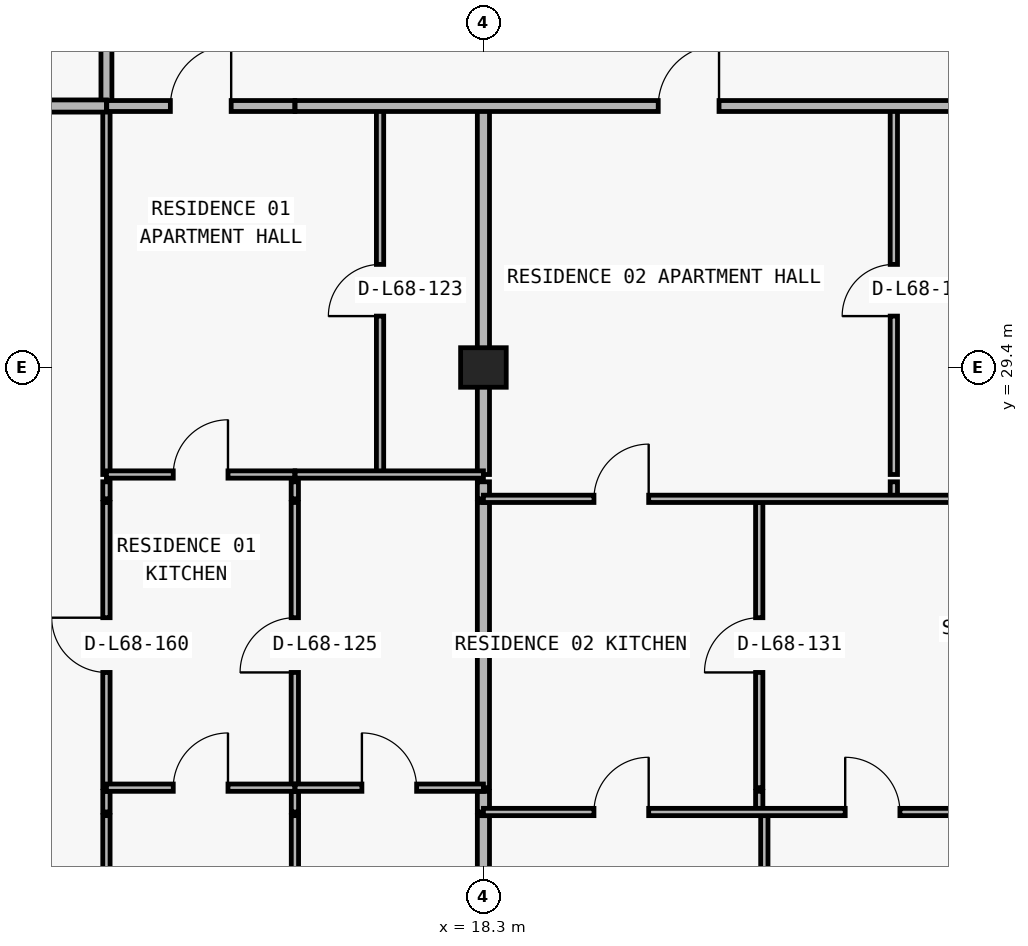
"""IFC4 building model, lengths in metres.
Left out: names, types, materials, properties, quantities, classifications, styles, units other than length and angle.
Written with IfcOpenShell. Run it as: python <this file> out.ifc"""

import sys

from ifc_helpers import new_model, si_unit, direction, frame, frame_2d, origin, origin_2d, place, context, subcontext, project, spatial, rectangle, extrude, element, fill, save


model = new_model("IFC4")
c1 = context("Model", 3, precision=1e-05, world=origin(), true_north=direction((0.0, 1.0)))
c2 = subcontext(c1, "Body", "Model", "MODEL_VIEW")
j1 = project(units=[si_unit("LENGTHUNIT", "METRE"), si_unit("PLANEANGLEUNIT", "RADIAN")], contexts=[c1])
p1 = place(None, origin())
s1 = spatial("IfcSite", under=j1, at=p1, CompositionType="ELEMENT")
p2 = place(p1, origin())
s2 = spatial("IfcBuilding", under=s1, at=p2, CompositionType="ELEMENT")
p3 = place(p2, frame((0.0, 0.0, 243.0)))
s3 = spatial("IfcBuildingStorey", under=s2, at=p3, CompositionType="ELEMENT", Elevation=243.0)
p4 = place(p3, frame((18.3, 29.4, 0.0), z_axis=(0.0, 0.0, 1.0), x_axis=(1.0, 0.0, 0.0)))
e1 = element("IfcColumn", 1, at=p4, inside=s3, PredefinedType="COLUMN", context=c2, shape_type="SweptSolid", body=[
    extrude(rectangle(XDim=0.75, YDim=0.65, at=origin_2d()), origin(), (0.0, 0.0, 1.0), 3.05),
])
p5 = place(p3, frame((12.1, 13.385, 0.0), z_axis=(0.0, 0.0, 1.0), x_axis=(0.0, 1.0, 0.0)))
e2 = element("IfcWall", 2, at=p5, inside=s3, PredefinedType="PARTITIONING", context=c2, shape_type="SweptSolid", body=[
    extrude(rectangle(XDim=8.645, YDim=0.12, at=frame_2d((4.323, 0.0))), origin(), (0.0, 0.0, 1.0), 3.05),
])
p6 = place(p3, frame((12.1, 22.09, 0.0), z_axis=(0.0, 0.0, 1.0), x_axis=(0.0, 1.0, 0.0)))
e3 = element("IfcWall", 3, at=p6, inside=s3, PredefinedType="PARTITIONING", context=c2, shape_type="SweptSolid", body=[
    extrude(rectangle(XDim=0.34, YDim=0.12, at=frame_2d((0.17, 0.0))), origin(), (0.0, 0.0, 1.0), 3.05),
])
p7 = place(p3, frame((12.1, 22.49, 0.0), z_axis=(0.0, 0.0, 1.0), x_axis=(0.0, 1.0, 0.0)))
e4 = element("IfcWall", 4, at=p7, inside=s3, PredefinedType="PARTITIONING", context=c2, shape_type="SweptSolid", body=[
    extrude(rectangle(XDim=4.69, YDim=0.12, at=frame_2d((2.345, 0.0))), origin(), (0.0, 0.0, 1.0), 3.05),
])
p8 = place(p7, frame((1.895, 0.0, 0.0)))
e5 = element("IfcOpeningElement", 5, at=p8, cuts=e4, PredefinedType="OPENING", context=c2, shape_type="SweptSolid", body=[
    extrude(rectangle(XDim=0.9, YDim=2.15, at=frame_2d((0.45, 1.075))), frame((0.0, 0.07, 0.0), z_axis=(0.0, -1.0, 0.0), x_axis=(1.0, 0.0, 0.0)), (0.0, 0.0, 1.0), 0.14),
])
p9 = place(p3, frame((12.1, 27.24, 0.0), z_axis=(0.0, 0.0, 1.0), x_axis=(0.0, 1.0, 0.0)))
e6 = element("IfcWall", 6, at=p9, inside=s3, PredefinedType="PARTITIONING", context=c2, shape_type="SweptSolid", body=[
    extrude(rectangle(XDim=0.28, YDim=0.12, at=frame_2d((0.14, 0.0))), origin(), (0.0, 0.0, 1.0), 3.05),
])
p10 = place(p3, frame((12.1, 27.64, 0.0), z_axis=(0.0, 0.0, 1.0), x_axis=(0.0, 1.0, 0.0)))
e7 = element("IfcWall", 7, at=p10, inside=s3, PredefinedType="PARTITIONING", context=c2, shape_type="SweptSolid", body=[
    extrude(rectangle(XDim=6.06, YDim=0.12, at=frame_2d((3.03, 0.0))), origin(), (0.0, 0.0, 1.0), 3.05),
])
p11 = place(p3, frame((12.1, 33.705, 0.0), z_axis=(0.0, 0.0, 1.0), x_axis=(0.0, 1.0, 0.0)))
e8 = element("IfcWall", 8, at=p11, inside=s3, PredefinedType="PARTITIONING", context=c2, shape_type="SweptSolid", body=[
    extrude(rectangle(XDim=3.295, YDim=0.18, at=frame_2d((1.647, 0.0))), origin(), (0.0, 0.0, 1.0), 3.05),
])
p12 = place(p3, frame((15.198, 22.49, 0.0), z_axis=(0.0, 0.0, 1.0), x_axis=(0.0, 1.0, 0.0)))
e9 = element("IfcWall", 9, at=p12, inside=s3, PredefinedType="PARTITIONING", context=c2, shape_type="SweptSolid", body=[
    extrude(rectangle(XDim=4.69, YDim=0.12, at=frame_2d((2.345, 0.0))), origin(), (0.0, 0.0, 1.0), 3.05),
])
p13 = place(p12, frame((1.895, 0.0, 0.0)))
e10 = element("IfcOpeningElement", 10, at=p13, cuts=e9, PredefinedType="OPENING", context=c2, shape_type="SweptSolid", body=[
    extrude(rectangle(XDim=0.9, YDim=2.15, at=frame_2d((0.45, 1.075))), frame((0.0, 0.07, 0.0), z_axis=(0.0, -1.0, 0.0), x_axis=(1.0, 0.0, 0.0)), (0.0, 0.0, 1.0), 0.14),
])
p14 = place(p3, frame((15.198, 27.24, 0.0), z_axis=(0.0, 0.0, 1.0), x_axis=(0.0, 1.0, 0.0)))
e11 = element("IfcWall", 11, at=p14, inside=s3, PredefinedType="PARTITIONING", context=c2, shape_type="SweptSolid", body=[
    extrude(rectangle(XDim=0.28, YDim=0.12, at=frame_2d((0.14, 0.0))), origin(), (0.0, 0.0, 1.0), 3.05),
])
p15 = place(p3, frame((15.2, 13.34, 0.0), z_axis=(0.0, 0.0, 1.0), x_axis=(0.0, 1.0, 0.0)))
e12 = element("IfcWall", 12, at=p15, inside=s3, PredefinedType="PARTITIONING", context=c2, shape_type="SweptSolid", body=[
    extrude(rectangle(XDim=8.69, YDim=0.12, at=frame_2d((4.345, 0.0))), origin(), (0.0, 0.0, 1.0), 3.05),
])
p16 = place(p3, frame((15.2, 22.09, 0.0), z_axis=(0.0, 0.0, 1.0), x_axis=(0.0, 1.0, 0.0)))
e13 = element("IfcWall", 13, at=p16, inside=s3, PredefinedType="PARTITIONING", context=c2, shape_type="SweptSolid", body=[
    extrude(rectangle(XDim=0.34, YDim=0.12, at=frame_2d((0.17, 0.0))), origin(), (0.0, 0.0, 1.0), 3.05),
])
p17 = place(p3, frame((16.6, 27.64, 0.0), z_axis=(0.0, 0.0, 1.0), x_axis=(0.0, 1.0, 0.0)))
e14 = element("IfcWall", 14, at=p17, inside=s3, PredefinedType="PARTITIONING", context=c2, shape_type="SweptSolid", body=[
    extrude(rectangle(XDim=6.06, YDim=0.12, at=frame_2d((3.03, 0.0))), origin(), (0.0, 0.0, 1.0), 3.05),
])
p18 = place(p17, frame((2.605, 0.0, 0.0)))
e15 = element("IfcOpeningElement", 15, at=p18, cuts=e14, PredefinedType="OPENING", context=c2, shape_type="SweptSolid", body=[
    extrude(rectangle(XDim=0.85, YDim=2.1, at=frame_2d((0.425, 1.05))), frame((0.0, 0.07, 0.0), z_axis=(0.0, -1.0, 0.0), x_axis=(1.0, 0.0, 0.0)), (0.0, 0.0, 1.0), 0.14),
])
p19 = place(p3, frame((18.3, 13.34, 0.0), z_axis=(0.0, 0.0, 1.0), x_axis=(0.0, 1.0, 0.0)))
e16 = element("IfcWall", 16, at=p19, inside=s3, PredefinedType="PARTITIONING", context=c2, shape_type="SweptSolid", body=[
    extrude(rectangle(XDim=8.69, YDim=0.2, at=frame_2d((4.345, 0.0))), origin(), (0.0, 0.0, 1.0), 2.263),
])
p20 = place(p3, frame((18.3, 22.09, 0.0), z_axis=(0.0, 0.0, 1.0), x_axis=(0.0, 1.0, 0.0)))
e17 = element("IfcWall", 17, at=p20, inside=s3, PredefinedType="PARTITIONING", context=c2, shape_type="SweptSolid", body=[
    extrude(rectangle(XDim=0.34, YDim=0.2, at=frame_2d((0.17, 0.0))), origin(), (0.0, 0.0, 1.0), 2.263),
])
p21 = place(p3, frame((18.3, 22.49, 0.0), z_axis=(0.0, 0.0, 1.0), x_axis=(0.0, 1.0, 0.0)))
e18 = element("IfcWall", 18, at=p21, inside=s3, PredefinedType="PARTITIONING", context=c2, shape_type="SweptSolid", body=[
    extrude(rectangle(XDim=4.69, YDim=0.2, at=frame_2d((2.345, 0.0))), origin(), (0.0, 0.0, 1.0), 2.263),
])
p22 = place(p3, frame((18.3, 27.24, 0.0), z_axis=(0.0, 0.0, 1.0), x_axis=(0.0, 1.0, 0.0)))
e19 = element("IfcWall", 19, at=p22, inside=s3, PredefinedType="PARTITIONING", context=c2, shape_type="SweptSolid", body=[
    extrude(rectangle(XDim=0.28, YDim=0.2, at=frame_2d((0.14, 0.0))), origin(), (0.0, 0.0, 1.0), 2.263),
])
p23 = place(p3, frame((18.3, 27.64, 0.0), z_axis=(0.0, 0.0, 1.0), x_axis=(0.0, 1.0, 0.0)))
e20 = element("IfcWall", 20, at=p23, inside=s3, PredefinedType="PARTITIONING", context=c2, shape_type="SweptSolid", body=[
    extrude(rectangle(XDim=6.06, YDim=0.2, at=frame_2d((3.03, 0.0))), origin(), (0.0, 0.0, 1.0), 2.263),
])
p24 = place(p3, frame((22.836, 22.09, 0.0), z_axis=(0.0, 0.0, 1.0), x_axis=(0.0, 1.0, 0.0)))
e21 = element("IfcWall", 21, at=p24, inside=s3, PredefinedType="PARTITIONING", context=c2, shape_type="SweptSolid", body=[
    extrude(rectangle(XDim=0.34, YDim=0.12, at=frame_2d((0.17, 0.0))), origin(), (0.0, 0.0, 1.0), 3.05),
])
p25 = place(p3, frame((22.836, 22.49, 0.0), z_axis=(0.0, 0.0, 1.0), x_axis=(0.0, 1.0, 0.0)))
e22 = element("IfcWall", 22, at=p25, inside=s3, PredefinedType="PARTITIONING", context=c2, shape_type="SweptSolid", body=[
    extrude(rectangle(XDim=4.69, YDim=0.12, at=frame_2d((2.345, 0.0))), origin(), (0.0, 0.0, 1.0), 3.05),
])
p26 = place(p25, frame((1.895, 0.0, 0.0)))
e23 = element("IfcOpeningElement", 23, at=p26, cuts=e22, PredefinedType="OPENING", context=c2, shape_type="SweptSolid", body=[
    extrude(rectangle(XDim=0.9, YDim=2.15, at=frame_2d((0.45, 1.075))), frame((0.0, 0.07, 0.0), z_axis=(0.0, -1.0, 0.0), x_axis=(1.0, 0.0, 0.0)), (0.0, 0.0, 1.0), 0.14),
])
p27 = place(p3, frame((22.92, 13.34, 0.0), z_axis=(0.0, 0.0, 1.0), x_axis=(0.0, 1.0, 0.0)))
e24 = element("IfcWall", 24, at=p27, inside=s3, PredefinedType="PARTITIONING", context=c2, shape_type="SweptSolid", body=[
    extrude(rectangle(XDim=8.69, YDim=0.12, at=frame_2d((4.345, 0.0))), origin(), (0.0, 0.0, 1.0), 3.05),
])
p28 = place(p3, frame((25.05, 27.24, 0.0), z_axis=(0.0, 0.0, 1.0), x_axis=(0.0, 1.0, 0.0)))
e25 = element("IfcWall", 25, at=p28, inside=s3, PredefinedType="PARTITIONING", context=c2, shape_type="SweptSolid", body=[
    extrude(rectangle(XDim=0.28, YDim=0.12, at=frame_2d((0.14, 0.0))), origin(), (0.0, 0.0, 1.0), 3.05),
])
p29 = place(p3, frame((25.05, 27.64, 0.0), z_axis=(0.0, 0.0, 1.0), x_axis=(0.0, 1.0, 0.0)))
e26 = element("IfcWall", 26, at=p29, inside=s3, PredefinedType="PARTITIONING", context=c2, shape_type="SweptSolid", body=[
    extrude(rectangle(XDim=6.06, YDim=0.12, at=frame_2d((3.03, 0.0))), origin(), (0.0, 0.0, 1.0), 3.05),
])
p30 = place(p29, frame((2.605, 0.0, 0.0)))
e27 = element("IfcOpeningElement", 27, at=p30, cuts=e26, PredefinedType="OPENING", context=c2, shape_type="SweptSolid", body=[
    extrude(rectangle(XDim=0.85, YDim=2.1, at=frame_2d((0.425, 1.05))), frame((0.0, 0.07, 0.0), z_axis=(0.0, -1.0, 0.0), x_axis=(1.0, 0.0, 0.0)), (0.0, 0.0, 1.0), 0.14),
])
p31 = place(p3, frame((18.3, 22.09, 0.0), z_axis=(0.0, 0.0, 1.0), x_axis=(1.0, 0.0, 0.0)))
e28 = element("IfcWall", 28, at=p31, inside=s3, PredefinedType="PARTITIONING", context=c2, shape_type="SweptSolid", body=[
    extrude(rectangle(XDim=8.18, YDim=0.12, at=frame_2d((4.09, 0.0))), origin(), (0.0, 0.0, 1.0), 3.05),
])
p32 = place(p31, frame((1.818, 0.0, 0.0)))
e29 = element("IfcOpeningElement", 29, at=p32, cuts=e28, PredefinedType="OPENING", context=c2, shape_type="SweptSolid", body=[
    extrude(rectangle(XDim=0.9, YDim=2.15, at=frame_2d((0.45, 1.075))), frame((0.0, 0.07, 0.0), z_axis=(0.0, -1.0, 0.0), x_axis=(1.0, 0.0, 0.0)), (0.0, 0.0, 1.0), 0.14),
])
p33 = place(p31, frame((5.95, 0.0, 0.0)))
e30 = element("IfcOpeningElement", 30, at=p33, cuts=e28, PredefinedType="OPENING", context=c2, shape_type="SweptSolid", body=[
    extrude(rectangle(XDim=0.9, YDim=2.15, at=frame_2d((0.45, 1.075))), frame((0.0, 0.07, 0.0), z_axis=(0.0, -1.0, 0.0), x_axis=(1.0, 0.0, 0.0)), (0.0, 0.0, 1.0), 0.14),
])
p34 = place(p3, frame((12.1, 22.49, 0.0), z_axis=(0.0, 0.0, 1.0), x_axis=(1.0, 0.0, 0.0)))
e31 = element("IfcWall", 31, at=p34, inside=s3, PredefinedType="PARTITIONING", context=c2, shape_type="SweptSolid", body=[
    extrude(rectangle(XDim=3.098, YDim=0.12, at=frame_2d((1.549, 0.0))), origin(), (0.0, 0.0, 1.0), 3.05),
])
p35 = place(p34, frame((1.099, 0.0, 0.0)))
e32 = element("IfcOpeningElement", 32, at=p35, cuts=e31, PredefinedType="OPENING", context=c2, shape_type="SweptSolid", body=[
    extrude(rectangle(XDim=0.9, YDim=2.15, at=frame_2d((0.45, 1.075))), frame((0.0, 0.07, 0.0), z_axis=(0.0, -1.0, 0.0), x_axis=(1.0, 0.0, 0.0)), (0.0, 0.0, 1.0), 0.14),
])
p36 = place(p3, frame((15.203, 22.49, 0.0), z_axis=(0.0, 0.0, 1.0), x_axis=(1.0, 0.0, 0.0)))
e33 = element("IfcWall", 33, at=p36, inside=s3, PredefinedType="PARTITIONING", context=c2, shape_type="SweptSolid", body=[
    extrude(rectangle(XDim=3.097, YDim=0.12, at=frame_2d((1.549, 0.0))), origin(), (0.0, 0.0, 1.0), 3.05),
])
p37 = place(p36, frame((1.098, 0.0, 0.0)))
e34 = element("IfcOpeningElement", 34, at=p37, cuts=e33, PredefinedType="OPENING", context=c2, shape_type="SweptSolid", body=[
    extrude(rectangle(XDim=0.9, YDim=2.15, at=frame_2d((0.45, 1.075))), frame((0.0, 0.07, 0.0), z_axis=(0.0, -1.0, 0.0), x_axis=(1.0, 0.0, 0.0)), (0.0, 0.0, 1.0), 0.14),
])
p38 = place(p3, frame((18.3, 27.24, 0.0), z_axis=(0.0, 0.0, 1.0), x_axis=(1.0, 0.0, 0.0)))
e35 = element("IfcWall", 35, at=p38, inside=s3, PredefinedType="PARTITIONING", context=c2, shape_type="SweptSolid", body=[
    extrude(rectangle(XDim=8.18, YDim=0.12, at=frame_2d((4.09, 0.0))), origin(), (0.0, 0.0, 1.0), 3.05),
])
p39 = place(p38, frame((1.818, 0.0, 0.0)))
e36 = element("IfcOpeningElement", 36, at=p39, cuts=e35, PredefinedType="OPENING", context=c2, shape_type="SweptSolid", body=[
    extrude(rectangle(XDim=0.9, YDim=2.15, at=frame_2d((0.45, 1.075))), frame((0.0, 0.07, 0.0), z_axis=(0.0, -1.0, 0.0), x_axis=(1.0, 0.0, 0.0)), (0.0, 0.0, 1.0), 0.14),
])
p40 = place(p3, frame((12.1, 27.64, 0.0), z_axis=(0.0, 0.0, 1.0), x_axis=(1.0, 0.0, 0.0)))
e37 = element("IfcWall", 37, at=p40, inside=s3, PredefinedType="PARTITIONING", context=c2, shape_type="SweptSolid", body=[
    extrude(rectangle(XDim=3.098, YDim=0.12, at=frame_2d((1.549, 0.0))), origin(), (0.0, 0.0, 1.0), 3.05),
])
p41 = place(p40, frame((1.099, 0.0, 0.0)))
e38 = element("IfcOpeningElement", 38, at=p41, cuts=e37, PredefinedType="OPENING", context=c2, shape_type="SweptSolid", body=[
    extrude(rectangle(XDim=0.9, YDim=2.15, at=frame_2d((0.45, 1.075))), frame((0.0, 0.07, 0.0), z_axis=(0.0, -1.0, 0.0), x_axis=(1.0, 0.0, 0.0)), (0.0, 0.0, 1.0), 0.14),
])
p42 = place(p3, frame((15.203, 27.64, 0.0), z_axis=(0.0, 0.0, 1.0), x_axis=(1.0, 0.0, 0.0)))
e39 = element("IfcWall", 39, at=p42, inside=s3, PredefinedType="PARTITIONING", context=c2, shape_type="SweptSolid", body=[
    extrude(rectangle(XDim=3.097, YDim=0.12, at=frame_2d((1.549, 0.0))), origin(), (0.0, 0.0, 1.0), 3.05),
])
p43 = place(p3, frame((8.395, 33.7, 0.0), z_axis=(0.0, 0.0, 1.0), x_axis=(1.0, 0.0, 0.0)))
e40 = element("IfcWall", 40, at=p43, inside=s3, PredefinedType="PARTITIONING", context=c2, shape_type="SweptSolid", body=[
    extrude(rectangle(XDim=3.705, YDim=0.2, at=frame_2d((1.853, 0.0))), origin(), (0.0, 0.0, 1.0), 3.05),
])
p44 = place(p3, frame((12.105, 33.7, 0.0), z_axis=(0.0, 0.0, 1.0), x_axis=(1.0, 0.0, 0.0)))
e41 = element("IfcWall", 41, at=p44, inside=s3, PredefinedType="PARTITIONING", context=c2, shape_type="SweptSolid", body=[
    extrude(rectangle(XDim=3.093, YDim=0.18, at=frame_2d((1.546, 0.0))), origin(), (0.0, 0.0, 1.0), 3.05),
])
p45 = place(p44, frame((1.046, 0.0, 0.0)))
e42 = element("IfcOpeningElement", 42, at=p45, cuts=e41, PredefinedType="OPENING", context=c2, shape_type="SweptSolid", body=[
    extrude(rectangle(XDim=1.0, YDim=2.2, at=frame_2d((0.5, 1.1))), frame((0.0, 0.1, 0.0), z_axis=(0.0, -1.0, 0.0), x_axis=(1.0, 0.0, 0.0)), (0.0, 0.0, 1.0), 0.2),
])
p46 = place(p3, frame((15.203, 33.7, 0.0), z_axis=(0.0, 0.0, 1.0), x_axis=(1.0, 0.0, 0.0)))
e43 = element("IfcWall", 43, at=p46, inside=s3, PredefinedType="PARTITIONING", context=c2, shape_type="SweptSolid", body=[
    extrude(rectangle(XDim=25.992, YDim=0.18, at=frame_2d((12.996, 0.0))), origin(), (0.0, 0.0, 1.0), 3.05),
])
p47 = place(p46, frame((5.972, 0.0, 0.0)))
e44 = element("IfcOpeningElement", 44, at=p47, cuts=e43, PredefinedType="OPENING", context=c2, shape_type="SweptSolid", body=[
    extrude(rectangle(XDim=1.0, YDim=2.2, at=frame_2d((0.5, 1.1))), frame((0.0, 0.1, 0.0), z_axis=(0.0, -1.0, 0.0), x_axis=(1.0, 0.0, 0.0)), (0.0, 0.0, 1.0), 0.2),
])
p48 = place(p46, frame((14.364, 0.0, 0.0)))
e45 = element("IfcOpeningElement", 45, at=p48, cuts=e43, PredefinedType="OPENING", context=c2, shape_type="SweptSolid", body=[
    extrude(rectangle(XDim=1.0, YDim=2.2, at=frame_2d((0.5, 1.1))), frame((0.0, 0.1, 0.0), z_axis=(0.0, -1.0, 0.0), x_axis=(1.0, 0.0, 0.0)), (0.0, 0.0, 1.0), 0.2),
])
p49 = place(p45, origin())
e46 = element("IfcDoor", 46, at=p49, inside=s3, OperationType="SINGLE_SWING_RIGHT", PredefinedType="DOOR", context=c2, shape_type="SweptSolid", body=[
    extrude(rectangle(XDim=1.0, YDim=2.2, at=frame_2d((0.5, 1.1))), frame((0.0, 0.025, 0.0), z_axis=(0.0, -1.0, 0.0), x_axis=(1.0, 0.0, 0.0)), (0.0, 0.0, 1.0), 0.05),
])
fill(e42, e46)
p50 = place(p18, origin())
e47 = element("IfcDoor", 47, at=p50, inside=s3, OperationType="SINGLE_SWING_LEFT", PredefinedType="DOOR", context=c2, shape_type="SweptSolid", body=[
    extrude(rectangle(XDim=0.85, YDim=2.1, at=frame_2d((0.425, 1.05))), frame((0.0, 0.025, 0.0), z_axis=(0.0, -1.0, 0.0), x_axis=(1.0, 0.0, 0.0)), (0.0, 0.0, 1.0), 0.05),
])
fill(e15, e47)
p51 = place(p41, origin())
e48 = element("IfcDoor", 48, at=p51, inside=s3, OperationType="SINGLE_SWING_RIGHT", PredefinedType="DOOR", context=c2, shape_type="SweptSolid", body=[
    extrude(rectangle(XDim=0.9, YDim=2.15, at=frame_2d((0.45, 1.075))), frame((0.0, 0.025, 0.0), z_axis=(0.0, -1.0, 0.0), x_axis=(1.0, 0.0, 0.0)), (0.0, 0.0, 1.0), 0.05),
])
fill(e38, e48)
p52 = place(p13, origin())
e49 = element("IfcDoor", 49, at=p52, inside=s3, OperationType="SINGLE_SWING_LEFT", PredefinedType="DOOR", context=c2, shape_type="SweptSolid", body=[
    extrude(rectangle(XDim=0.9, YDim=2.15, at=frame_2d((0.45, 1.075))), frame((0.0, 0.025, 0.0), z_axis=(0.0, -1.0, 0.0), x_axis=(1.0, 0.0, 0.0)), (0.0, 0.0, 1.0), 0.05),
])
fill(e10, e49)
p53 = place(p35, origin())
e50 = element("IfcDoor", 50, at=p53, inside=s3, OperationType="SINGLE_SWING_RIGHT", PredefinedType="DOOR", context=c2, shape_type="SweptSolid", body=[
    extrude(rectangle(XDim=0.9, YDim=2.15, at=frame_2d((0.45, 1.075))), frame((0.0, 0.025, 0.0), z_axis=(0.0, -1.0, 0.0), x_axis=(1.0, 0.0, 0.0)), (0.0, 0.0, 1.0), 0.05),
])
fill(e32, e50)
p54 = place(p37, origin())
e51 = element("IfcDoor", 51, at=p54, inside=s3, OperationType="SINGLE_SWING_LEFT", PredefinedType="DOOR", context=c2, shape_type="SweptSolid", body=[
    extrude(rectangle(XDim=0.9, YDim=2.15, at=frame_2d((0.45, 1.075))), frame((0.0, 0.025, 0.0), z_axis=(0.0, -1.0, 0.0), x_axis=(1.0, 0.0, 0.0)), (0.0, 0.0, 1.0), 0.05),
])
fill(e34, e51)
p55 = place(p47, origin())
e52 = element("IfcDoor", 52, at=p55, inside=s3, OperationType="SINGLE_SWING_RIGHT", PredefinedType="DOOR", context=c2, shape_type="SweptSolid", body=[
    extrude(rectangle(XDim=1.0, YDim=2.2, at=frame_2d((0.5, 1.1))), frame((0.0, 0.025, 0.0), z_axis=(0.0, -1.0, 0.0), x_axis=(1.0, 0.0, 0.0)), (0.0, 0.0, 1.0), 0.05),
])
fill(e44, e52)
p56 = place(p30, origin())
e53 = element("IfcDoor", 53, at=p56, inside=s3, OperationType="SINGLE_SWING_LEFT", PredefinedType="DOOR", context=c2, shape_type="SweptSolid", body=[
    extrude(rectangle(XDim=0.85, YDim=2.1, at=frame_2d((0.425, 1.05))), frame((0.0, 0.025, 0.0), z_axis=(0.0, -1.0, 0.0), x_axis=(1.0, 0.0, 0.0)), (0.0, 0.0, 1.0), 0.05),
])
fill(e27, e53)
p57 = place(p39, origin())
e54 = element("IfcDoor", 54, at=p57, inside=s3, OperationType="SINGLE_SWING_RIGHT", PredefinedType="DOOR", context=c2, shape_type="SweptSolid", body=[
    extrude(rectangle(XDim=0.9, YDim=2.15, at=frame_2d((0.45, 1.075))), frame((0.0, 0.025, 0.0), z_axis=(0.0, -1.0, 0.0), x_axis=(1.0, 0.0, 0.0)), (0.0, 0.0, 1.0), 0.05),
])
fill(e36, e54)
p58 = place(p26, origin())
e55 = element("IfcDoor", 55, at=p58, inside=s3, OperationType="SINGLE_SWING_LEFT", PredefinedType="DOOR", context=c2, shape_type="SweptSolid", body=[
    extrude(rectangle(XDim=0.9, YDim=2.15, at=frame_2d((0.45, 1.075))), frame((0.0, 0.025, 0.0), z_axis=(0.0, -1.0, 0.0), x_axis=(1.0, 0.0, 0.0)), (0.0, 0.0, 1.0), 0.05),
])
fill(e23, e55)
p59 = place(p32, origin())
e56 = element("IfcDoor", 56, at=p59, inside=s3, OperationType="SINGLE_SWING_RIGHT", PredefinedType="DOOR", context=c2, shape_type="SweptSolid", body=[
    extrude(rectangle(XDim=0.9, YDim=2.15, at=frame_2d((0.45, 1.075))), frame((0.0, 0.025, 0.0), z_axis=(0.0, -1.0, 0.0), x_axis=(1.0, 0.0, 0.0)), (0.0, 0.0, 1.0), 0.05),
])
fill(e29, e56)
p60 = place(p33, origin())
e57 = element("IfcDoor", 57, at=p60, inside=s3, OperationType="SINGLE_SWING_LEFT", PredefinedType="DOOR", context=c2, shape_type="SweptSolid", body=[
    extrude(rectangle(XDim=0.9, YDim=2.15, at=frame_2d((0.45, 1.075))), frame((0.0, 0.025, 0.0), z_axis=(0.0, -1.0, 0.0), x_axis=(1.0, 0.0, 0.0)), (0.0, 0.0, 1.0), 0.05),
])
fill(e30, e57)
p61 = place(p8, origin())
e58 = element("IfcDoor", 58, at=p61, inside=s3, OperationType="SINGLE_SWING_RIGHT", PredefinedType="DOOR", context=c2, shape_type="SweptSolid", body=[
    extrude(rectangle(XDim=0.9, YDim=2.15, at=frame_2d((0.45, 1.075))), frame((0.0, 0.025, 0.0), z_axis=(0.0, -1.0, 0.0), x_axis=(1.0, 0.0, 0.0)), (0.0, 0.0, 1.0), 0.05),
])
fill(e5, e58)
save(model, sys.argv[1])
